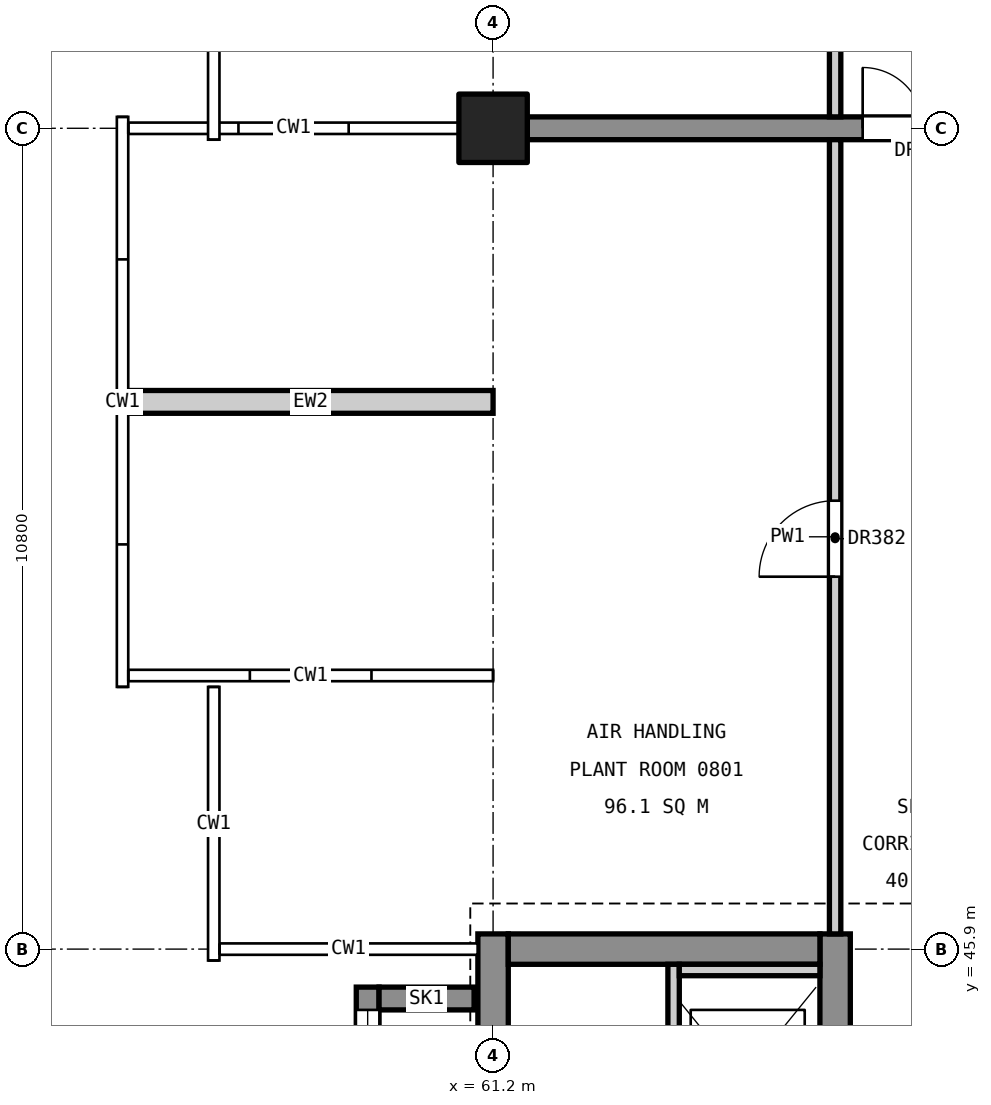
"""IFC4 building model, lengths in metres.
Left out: names, types, materials, properties, quantities, classifications, styles, units other than length and angle.
Written with IfcOpenShell. Run it as: python <this file> out.ifc"""

import sys

from ifc_helpers import new_model, si_unit, direction, frame, frame_2d, origin, origin_2d, place, context, subcontext, project, spatial, rectangle, extrude, element, fill, save


model = new_model("IFC4")
c1 = context("Model", 3, precision=1e-05, world=origin(), true_north=direction((0.0, 1.0)))
c2 = subcontext(c1, "Body", "Model", "MODEL_VIEW")
j1 = project(units=[si_unit("LENGTHUNIT", "METRE"), si_unit("PLANEANGLEUNIT", "RADIAN")], contexts=[c1])
p1 = place(None, origin())
s1 = spatial("IfcSite", under=j1, at=p1, CompositionType="ELEMENT")
p2 = place(p1, origin())
s2 = spatial("IfcBuilding", under=s1, at=p2, CompositionType="ELEMENT")
p3 = place(p2, frame((0.0, 0.0, 41.4)))
s3 = spatial("IfcBuildingStorey", under=s2, at=p3, CompositionType="ELEMENT", Elevation=41.4)
p4 = place(p3, frame((61.2, 56.7, 0.0), z_axis=(0.0, 0.0, 1.0), x_axis=(1.0, 0.0, 0.0)))
e1 = element("IfcColumn", 1, at=p4, inside=s3, PredefinedType="COLUMN", context=c2, shape_type="SweptSolid", body=[
    extrude(rectangle(XDim=0.9, YDim=0.9, at=origin_2d()), origin(), (0.0, 0.0, 1.0), 4.8),
])
p5 = place(p3, frame((61.2, 34.9, 0.0), z_axis=(0.0, 0.0, 1.0), x_axis=(0.0, 1.0, 0.0)))
e2 = element("IfcWall", 2, at=p5, inside=s3, PredefinedType="SHEAR", context=c2, shape_type="SweptSolid", body=[
    extrude(rectangle(XDim=11.2, YDim=0.4, at=frame_2d((5.6, 0.0))), origin(), (0.0, 0.0, 1.0), 4.55),
])
p6 = place(p5, frame((6.11, 0.0, 3.4)))
e3 = element("IfcOpeningElement", 3, at=p6, cuts=e2, PredefinedType="OPENING", context=c2, shape_type="SweptSolid", body=[
    extrude(rectangle(XDim=1.2, YDim=0.9, at=frame_2d((0.6, 0.45))), frame((0.0, 0.21, 0.0), z_axis=(0.0, -1.0, 0.0), x_axis=(1.0, 0.0, 0.0)), (0.0, 0.0, 1.0), 0.42),
])
p7 = place(p3, frame((65.7, 34.9, 0.0), z_axis=(0.0, 0.0, 1.0), x_axis=(0.0, 1.0, 0.0)))
e4 = element("IfcWall", 4, at=p7, inside=s3, PredefinedType="SHEAR", context=c2, shape_type="SweptSolid", body=[
    extrude(rectangle(XDim=11.2, YDim=0.4, at=frame_2d((5.6, 0.0))), origin(), (0.0, 0.0, 1.0), 4.55),
])
p8 = place(p7, frame((0.5, 0.0, 0.0)))
e5 = element("IfcOpeningElement", 5, at=p8, cuts=e4, PredefinedType="OPENING", context=c2, shape_type="SweptSolid", body=[
    extrude(rectangle(XDim=1.4, YDim=2.1, at=frame_2d((0.7, 1.05))), frame((0.0, 0.21, 0.0), z_axis=(0.0, -1.0, 0.0), x_axis=(1.0, 0.0, 0.0)), (0.0, 0.0, 1.0), 0.42),
])
p9 = place(p7, frame((8.75, 0.0, 0.0)))
e6 = element("IfcOpeningElement", 6, at=p9, cuts=e4, PredefinedType="OPENING", context=c2, shape_type="SweptSolid", body=[
    extrude(rectangle(XDim=1.1, YDim=2.1, at=frame_2d((0.55, 1.05))), frame((0.0, 0.21, 0.0), z_axis=(0.0, -1.0, 0.0), x_axis=(1.0, 0.0, 0.0)), (0.0, 0.0, 1.0), 0.42),
])
p10 = place(p3, frame((61.4, 45.9, 0.0), z_axis=(0.0, 0.0, 1.0), x_axis=(1.0, 0.0, 0.0)))
e7 = element("IfcWall", 7, at=p10, inside=s3, PredefinedType="SHEAR", context=c2, shape_type="SweptSolid", body=[
    extrude(rectangle(XDim=4.1, YDim=0.4, at=frame_2d((2.05, 0.0))), origin(), (0.0, 0.0, 1.0), 4.55),
])
p11 = place(p3, frame((59.55, 43.0, 0.0), z_axis=(0.0, 0.0, 1.0), x_axis=(0.0, 1.0, 0.0)))
e8 = element("IfcWall", 8, at=p11, inside=s3, PredefinedType="SHEAR", context=c2, shape_type="SweptSolid", body=[
    extrude(rectangle(XDim=2.4, YDim=0.3, at=frame_2d((1.2, 0.0))), origin(), (0.0, 0.0, 1.0), 4.8),
])
p12 = place(p11, frame((0.3, 0.0, 3.0)))
e9 = element("IfcOpeningElement", 9, at=p12, cuts=e8, PredefinedType="OPENING", context=c2, shape_type="SweptSolid", body=[
    extrude(rectangle(XDim=1.8, YDim=1.2, at=frame_2d((0.9, 0.6))), frame((0.0, 0.16, 0.0), z_axis=(0.0, -1.0, 0.0), x_axis=(1.0, 0.0, 0.0)), (0.0, 0.0, 1.0), 0.32),
])
p13 = place(p3, frame((60.95, 45.25, 0.0), z_axis=(0.0, 0.0, 1.0), x_axis=(-1.0, 0.0, 0.0)))
e10 = element("IfcWall", 10, at=p13, inside=s3, PredefinedType="SHEAR", context=c2, shape_type="SweptSolid", body=[
    extrude(rectangle(XDim=1.25, YDim=0.3, at=frame_2d((0.625, 0.0))), origin(), (0.0, 0.0, 1.0), 4.8),
])
p14 = place(p3, frame((61.65, 56.7, 0.0), z_axis=(0.0, 0.0, 1.0), x_axis=(1.0, 0.0, 0.0)))
e11 = element("IfcWall", 11, at=p14, inside=s3, PredefinedType="SHEAR", context=c2, shape_type="SweptSolid", body=[
    extrude(rectangle(XDim=6.3, YDim=0.3, at=frame_2d((3.15, 0.0))), origin(), (0.0, 0.0, 1.0), 4.55),
])
p15 = place(p14, frame((4.413, 0.0, 0.0)))
e12 = element("IfcOpeningElement", 12, at=p15, cuts=e11, PredefinedType="OPENING", context=c2, shape_type="SweptSolid", body=[
    extrude(rectangle(XDim=1.6, YDim=2.1, at=frame_2d((0.8, 1.05))), frame((0.0, 0.16, 0.0), z_axis=(0.0, -1.0, 0.0), x_axis=(1.0, 0.0, 0.0)), (0.0, 0.0, 1.0), 0.32),
])
p16 = place(p3, frame((63.575, 43.0, 0.0), z_axis=(0.0, 0.0, 1.0), x_axis=(0.0, 1.0, 0.0)))
e13 = element("IfcWall", 13, at=p16, inside=s3, PredefinedType="SOLIDWALL", context=c2, shape_type="SweptSolid", body=[
    extrude(rectangle(XDim=2.7, YDim=0.15, at=frame_2d((1.35, 0.0))), origin(), (0.0, 0.0, 1.0), 4.8),
])
p17 = place(p3, frame((63.65, 45.625, 0.0), z_axis=(0.0, 0.0, 1.0), x_axis=(1.0, 0.0, 0.0)))
e14 = element("IfcWall", 14, at=p17, inside=s3, PredefinedType="SOLIDWALL", context=c2, shape_type="SweptSolid", body=[
    extrude(rectangle(XDim=1.85, YDim=0.15, at=frame_2d((0.925, 0.0))), origin(), (0.0, 0.0, 1.0), 4.8),
])
p18 = place(p3, frame((56.4, 53.1, 0.0), z_axis=(0.0, 0.0, 1.0), x_axis=(1.0, 0.0, 0.0)))
e15 = element("IfcWall", 15, at=p18, inside=s3, PredefinedType="STANDARD", context=c2, shape_type="SweptSolid", body=[
    extrude(rectangle(XDim=4.8, YDim=0.3, at=frame_2d((2.4, 0.0))), origin(), (0.0, 0.0, 1.0), 3.65),
])
p19 = place(p3, frame((65.7, 46.1, 0.0), z_axis=(0.0, 0.0, 1.0), x_axis=(0.0, 1.0, 0.0)))
e16 = element("IfcWall", 16, at=p19, inside=s3, PredefinedType="PARTITIONING", context=c2, shape_type="SweptSolid", body=[
    extrude(rectangle(XDim=10.45, YDim=0.15, at=frame_2d((5.225, 0.0))), origin(), (0.0, 0.0, 1.0), 3.55),
])
p20 = place(p19, frame((4.7, 0.0, 0.0)))
e17 = element("IfcOpeningElement", 17, at=p20, cuts=e16, PredefinedType="OPENING", context=c2, shape_type="SweptSolid", body=[
    extrude(rectangle(XDim=1.0, YDim=2.1, at=frame_2d((0.5, 1.05))), frame((0.0, 0.085, 0.0), z_axis=(0.0, -1.0, 0.0), x_axis=(1.0, 0.0, 0.0)), (0.0, 0.0, 1.0), 0.17),
])
p21 = place(p3, frame((65.7, 56.85, 0.0), z_axis=(0.0, 0.0, 1.0), x_axis=(0.0, 1.0, 0.0)))
e18 = element("IfcWall", 18, at=p21, inside=s3, PredefinedType="PARTITIONING", context=c2, shape_type="SweptSolid", body=[
    extrude(rectangle(XDim=3.25, YDim=0.15, at=frame_2d((1.625, 0.0))), origin(), (0.0, 0.0, 1.0), 3.55),
])
p22 = place(p21, frame((1.15, 0.0, 0.0)))
e19 = element("IfcOpeningElement", 19, at=p22, cuts=e18, PredefinedType="OPENING", context=c2, shape_type="SweptSolid", body=[
    extrude(rectangle(XDim=1.0, YDim=2.1, at=frame_2d((0.5, 1.05))), frame((0.0, 0.085, 0.0), z_axis=(0.0, -1.0, 0.0), x_axis=(1.0, 0.0, 0.0)), (0.0, 0.0, 1.0), 0.17),
])
p23 = place(p12, origin())
e20 = element("IfcWindow", 20, at=p23, inside=s3, PartitioningType="SINGLE_PANEL", PredefinedType="WINDOW", context=c2, shape_type="SweptSolid", body=[
    extrude(rectangle(XDim=1.8, YDim=1.2, at=frame_2d((0.9, 0.6))), frame((0.0, 0.03, 0.0), z_axis=(0.0, -1.0, 0.0), x_axis=(1.0, 0.0, 0.0)), (0.0, 0.0, 1.0), 0.06),
])
fill(e9, e20)
p24 = place(p20, origin())
e21 = element("IfcDoor", 21, at=p24, inside=s3, OperationType="SINGLE_SWING_LEFT", PredefinedType="DOOR", context=c2, shape_type="SweptSolid", body=[
    extrude(rectangle(XDim=1.0, YDim=2.1, at=frame_2d((0.5, 1.05))), frame((0.0, 0.025, 0.0), z_axis=(0.0, -1.0, 0.0), x_axis=(1.0, 0.0, 0.0)), (0.0, 0.0, 1.0), 0.05),
])
fill(e17, e21)
p25 = place(p15, origin())
e22 = element("IfcDoor", 22, at=p25, inside=s3, OperationType="DOUBLE_DOOR_SINGLE_SWING", PredefinedType="DOOR", context=c2, shape_type="SweptSolid", body=[
    extrude(rectangle(XDim=1.6, YDim=2.1, at=frame_2d((0.8, 1.05))), frame((0.0, 0.025, 0.0), z_axis=(0.0, -1.0, 0.0), x_axis=(1.0, 0.0, 0.0)), (0.0, 0.0, 1.0), 0.05),
])
fill(e12, e22)
save(model, sys.argv[1])
